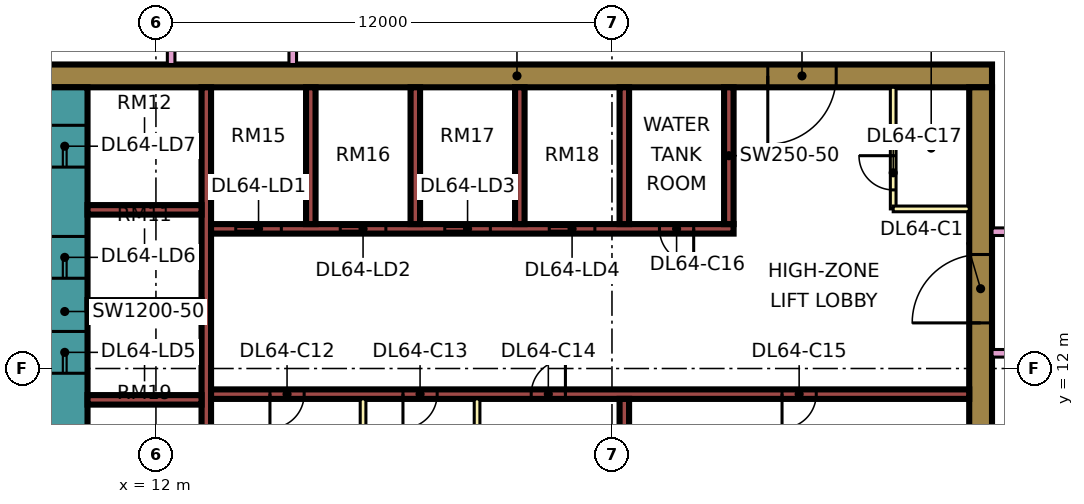
"""IFC4 building model, lengths in metres.
Left out: names, types, materials, properties, quantities, classifications, styles, units other than length and angle.
Written with IfcOpenShell. Run it as: python <this file> out.ifc"""

import sys

from ifc_helpers import new_model, si_unit, direction, frame, frame_2d, origin, place, context, subcontext, project, spatial, rectangle, extrude, element, fill, save


model = new_model("IFC4")
c1 = context("Model", 3, precision=1e-05, world=origin(), true_north=direction((0.0, 1.0)))
c2 = subcontext(c1, "Body", "Model", "MODEL_VIEW")
j1 = project(units=[si_unit("LENGTHUNIT", "METRE"), si_unit("PLANEANGLEUNIT", "RADIAN")], contexts=[c1])
p1 = place(None, origin())
s1 = spatial("IfcSite", under=j1, at=p1, CompositionType="ELEMENT")
p2 = place(p1, origin())
s2 = spatial("IfcBuilding", under=s1, at=p2, CompositionType="ELEMENT")
p3 = place(p2, frame((0.0, 0.0, 277.15)))
s3 = spatial("IfcBuildingStorey", under=s2, at=p3, CompositionType="ELEMENT", Elevation=277.15)
p4 = place(p3, frame((9.0, 19.7, 0.0), z_axis=(0.0, 0.0, 1.0), x_axis=(1.0, 0.0, 0.0)))
e1 = element("IfcWall", 1, at=p4, inside=s3, PredefinedType="SHEAR", context=c2, shape_type="SweptSolid", body=[
    extrude(rectangle(XDim=25.0, YDim=0.6, at=frame_2d((12.5, 0.0))), origin(), (0.0, 0.0, 1.0), 3.75),
])
p5 = place(p4, frame((19.1, 0.0, 0.0)))
e2 = element("IfcOpeningElement", 2, at=p5, cuts=e1, PredefinedType="OPENING", context=c2, shape_type="SweptSolid", body=[
    extrude(rectangle(XDim=1.8, YDim=2.4, at=frame_2d((0.9, 1.2))), frame((0.0, 0.31, 0.0), z_axis=(0.0, -1.0, 0.0), x_axis=(1.0, 0.0, 0.0)), (0.0, 0.0, 1.0), 0.62),
])
p6 = place(p3, frame((9.6, 7.6, 0.0), z_axis=(0.0, 0.0, 1.0), x_axis=(0.0, 1.0, 0.0)))
e3 = element("IfcWall", 3, at=p6, inside=s3, PredefinedType="SHEAR", context=c2, shape_type="SweptSolid", body=[
    extrude(rectangle(XDim=11.8, YDim=1.2, at=frame_2d((5.9, 0.0))), origin(), (0.0, 0.0, 1.0), 3.75),
])
p7 = place(p6, frame((4.275, 0.0, 0.0)))
e4 = element("IfcOpeningElement", 4, at=p7, cuts=e3, PredefinedType="OPENING", context=c2, shape_type="SweptSolid", body=[
    extrude(rectangle(XDim=1.1, YDim=2.2, at=frame_2d((0.55, 1.1))), frame((0.0, 0.61, 0.0), z_axis=(0.0, -1.0, 0.0), x_axis=(1.0, 0.0, 0.0)), (0.0, 0.0, 1.0), 1.22),
])
p8 = place(p6, frame((6.775, 0.0, 0.0)))
e5 = element("IfcOpeningElement", 5, at=p8, cuts=e3, PredefinedType="OPENING", context=c2, shape_type="SweptSolid", body=[
    extrude(rectangle(XDim=1.1, YDim=2.2, at=frame_2d((0.55, 1.1))), frame((0.0, 0.61, 0.0), z_axis=(0.0, -1.0, 0.0), x_axis=(1.0, 0.0, 0.0)), (0.0, 0.0, 1.0), 1.22),
])
p9 = place(p6, frame((9.7, 0.0, 0.0)))
e6 = element("IfcOpeningElement", 6, at=p9, cuts=e3, PredefinedType="OPENING", context=c2, shape_type="SweptSolid", body=[
    extrude(rectangle(XDim=1.1, YDim=2.2, at=frame_2d((0.55, 1.1))), frame((0.0, 0.61, 0.0), z_axis=(0.0, -1.0, 0.0), x_axis=(1.0, 0.0, 0.0)), (0.0, 0.0, 1.0), 1.22),
])
p10 = place(p6, frame((1.95, 0.0, 0.0)))
e7 = element("IfcOpeningElement", 7, at=p10, cuts=e3, PredefinedType="OPENING", context=c2, shape_type="SweptSolid", body=[
    extrude(rectangle(XDim=0.9, YDim=2.1, at=frame_2d((0.45, 1.05))), frame((0.0, 0.61, 0.0), z_axis=(0.0, -1.0, 0.0), x_axis=(1.0, 0.0, 0.0)), (0.0, 0.0, 1.0), 1.22),
])
p11 = place(p3, frame((33.7, 7.6, 0.0), z_axis=(0.0, 0.0, 1.0), x_axis=(0.0, 1.0, 0.0)))
e8 = element("IfcWall", 8, at=p11, inside=s3, PredefinedType="SHEAR", context=c2, shape_type="SweptSolid", body=[
    extrude(rectangle(XDim=11.8, YDim=0.6, at=frame_2d((5.9, 0.0))), origin(), (0.0, 0.0, 1.0), 3.75),
])
p12 = place(p11, frame((5.6, 0.0, 0.0)))
e9 = element("IfcOpeningElement", 9, at=p12, cuts=e8, PredefinedType="OPENING", context=c2, shape_type="SweptSolid", body=[
    extrude(rectangle(XDim=1.8, YDim=2.4, at=frame_2d((0.9, 1.2))), frame((0.0, 0.31, 0.0), z_axis=(0.0, -1.0, 0.0), x_axis=(1.0, 0.0, 0.0)), (0.0, 0.0, 1.0), 0.62),
])
p13 = place(p3, frame((13.325, 7.6, 0.0), z_axis=(0.0, 0.0, 1.0), x_axis=(0.0, 1.0, 0.0)))
e10 = element("IfcWall", 10, at=p13, inside=s3, PredefinedType="SHEAR", context=c2, shape_type="SweptSolid", body=[
    extrude(rectangle(XDim=11.8, YDim=0.25, at=frame_2d((5.9, 0.0))), origin(), (0.0, 0.0, 1.0), 3.75),
])
p14 = place(p3, frame((13.45, 11.325, 0.0), z_axis=(0.0, 0.0, 1.0), x_axis=(1.0, 0.0, 0.0)))
e11 = element("IfcWall", 11, at=p14, inside=s3, PredefinedType="SHEAR", context=c2, shape_type="SweptSolid", body=[
    extrude(rectangle(XDim=19.95, YDim=0.25, at=frame_2d((9.975, 0.0))), origin(), (0.0, 0.0, 1.0), 3.75),
])
p15 = place(p14, frame((1.55, 0.0, 0.0)))
e12 = element("IfcOpeningElement", 12, at=p15, cuts=e11, PredefinedType="OPENING", context=c2, shape_type="SweptSolid", body=[
    extrude(rectangle(XDim=0.9, YDim=2.1, at=frame_2d((0.45, 1.05))), frame((0.0, 0.135, 0.0), z_axis=(0.0, -1.0, 0.0), x_axis=(1.0, 0.0, 0.0)), (0.0, 0.0, 1.0), 0.27),
])
p16 = place(p14, frame((5.05, 0.0, 0.0)))
e13 = element("IfcOpeningElement", 13, at=p16, cuts=e11, PredefinedType="OPENING", context=c2, shape_type="SweptSolid", body=[
    extrude(rectangle(XDim=0.9, YDim=2.1, at=frame_2d((0.45, 1.05))), frame((0.0, 0.135, 0.0), z_axis=(0.0, -1.0, 0.0), x_axis=(1.0, 0.0, 0.0)), (0.0, 0.0, 1.0), 0.27),
])
p17 = place(p14, frame((8.425, 0.0, 0.0)))
e14 = element("IfcOpeningElement", 14, at=p17, cuts=e11, PredefinedType="OPENING", context=c2, shape_type="SweptSolid", body=[
    extrude(rectangle(XDim=0.9, YDim=2.1, at=frame_2d((0.45, 1.05))), frame((0.0, 0.135, 0.0), z_axis=(0.0, -1.0, 0.0), x_axis=(1.0, 0.0, 0.0)), (0.0, 0.0, 1.0), 0.27),
])
p18 = place(p14, frame((15.025, 0.0, 0.0)))
e15 = element("IfcOpeningElement", 15, at=p18, cuts=e11, PredefinedType="OPENING", context=c2, shape_type="SweptSolid", body=[
    extrude(rectangle(XDim=0.9, YDim=2.1, at=frame_2d((0.45, 1.05))), frame((0.0, 0.135, 0.0), z_axis=(0.0, -1.0, 0.0), x_axis=(1.0, 0.0, 0.0)), (0.0, 0.0, 1.0), 0.27),
])
p19 = place(p3, frame((13.45, 15.675, 0.0), z_axis=(0.0, 0.0, 1.0), x_axis=(1.0, 0.0, 0.0)))
e16 = element("IfcWall", 16, at=p19, inside=s3, PredefinedType="SHEAR", context=c2, shape_type="SweptSolid", body=[
    extrude(rectangle(XDim=13.75, YDim=0.25, at=frame_2d((6.875, 0.0))), origin(), (0.0, 0.0, 1.0), 3.75),
])
p20 = place(p19, frame((0.65, 0.0, 0.0)))
e17 = element("IfcOpeningElement", 17, at=p20, cuts=e16, PredefinedType="OPENING", context=c2, shape_type="SweptSolid", body=[
    extrude(rectangle(XDim=1.2, YDim=2.2, at=frame_2d((0.6, 1.1))), frame((0.0, 0.135, 0.0), z_axis=(0.0, -1.0, 0.0), x_axis=(1.0, 0.0, 0.0)), (0.0, 0.0, 1.0), 0.27),
])
p21 = place(p19, frame((3.4, 0.0, 0.0)))
e18 = element("IfcOpeningElement", 18, at=p21, cuts=e16, PredefinedType="OPENING", context=c2, shape_type="SweptSolid", body=[
    extrude(rectangle(XDim=1.2, YDim=2.2, at=frame_2d((0.6, 1.1))), frame((0.0, 0.135, 0.0), z_axis=(0.0, -1.0, 0.0), x_axis=(1.0, 0.0, 0.0)), (0.0, 0.0, 1.0), 0.27),
])
p22 = place(p19, frame((6.15, 0.0, 0.0)))
e19 = element("IfcOpeningElement", 19, at=p22, cuts=e16, PredefinedType="OPENING", context=c2, shape_type="SweptSolid", body=[
    extrude(rectangle(XDim=1.2, YDim=2.2, at=frame_2d((0.6, 1.1))), frame((0.0, 0.135, 0.0), z_axis=(0.0, -1.0, 0.0), x_axis=(1.0, 0.0, 0.0)), (0.0, 0.0, 1.0), 0.27),
])
p23 = place(p19, frame((8.9, 0.0, 0.0)))
e20 = element("IfcOpeningElement", 20, at=p23, cuts=e16, PredefinedType="OPENING", context=c2, shape_type="SweptSolid", body=[
    extrude(rectangle(XDim=1.2, YDim=2.2, at=frame_2d((0.6, 1.1))), frame((0.0, 0.135, 0.0), z_axis=(0.0, -1.0, 0.0), x_axis=(1.0, 0.0, 0.0)), (0.0, 0.0, 1.0), 0.27),
])
p24 = place(p19, frame((11.8, 0.0, 0.0)))
e21 = element("IfcOpeningElement", 21, at=p24, cuts=e16, PredefinedType="OPENING", context=c2, shape_type="SweptSolid", body=[
    extrude(rectangle(XDim=0.9, YDim=2.1, at=frame_2d((0.45, 1.05))), frame((0.0, 0.135, 0.0), z_axis=(0.0, -1.0, 0.0), x_axis=(1.0, 0.0, 0.0)), (0.0, 0.0, 1.0), 0.27),
])
for number, where, z_axis, x_axis in (
    (22, (10.2, 11.175, 0.0), (0.0, 0.0, 1.0), (1.0, 0.0, 0.0)),
    (23, (10.2, 13.675, 0.0), (0.0, 0.0, 1.0), (1.0, 0.0, 0.0)),
    (24, (10.2, 16.175, 0.0), (0.0, 0.0, 1.0), (1.0, 0.0, 0.0)),
):
    element("IfcWall", number, at=place(p3, frame(where, z_axis=z_axis, x_axis=x_axis)), inside=s3, PredefinedType="SHEAR", context=c2, shape_type="SweptSolid", body=[
        extrude(rectangle(XDim=3.0, YDim=0.25, at=frame_2d((1.5, 0.0))), origin(), (0.0, 0.0, 1.0), 3.75),
    ])
for number, where, z_axis, x_axis in (
    (25, (24.325, 7.6, 0.0), (0.0, 0.0, 1.0), (0.0, 1.0, 0.0)),
    (26, (16.075, 15.8, 0.0), (0.0, 0.0, 1.0), (0.0, 1.0, 0.0)),
    (27, (18.825, 15.8, 0.0), (0.0, 0.0, 1.0), (0.0, 1.0, 0.0)),
    (28, (21.575, 15.8, 0.0), (0.0, 0.0, 1.0), (0.0, 1.0, 0.0)),
    (29, (24.325, 15.8, 0.0), (0.0, 0.0, 1.0), (0.0, 1.0, 0.0)),
    (30, (27.075, 15.8, 0.0), (0.0, 0.0, 1.0), (0.0, 1.0, 0.0)),
):
    element("IfcWall", number, at=place(p3, frame(where, z_axis=z_axis, x_axis=x_axis)), inside=s3, PredefinedType="SHEAR", context=c2, shape_type="SweptSolid", body=[
        extrude(rectangle(XDim=3.6, YDim=0.25, at=frame_2d((1.8, 0.0))), origin(), (0.0, 0.0, 1.0), 3.75),
    ])
p25 = place(p3, frame((-1.447, 12.553, 0.0), z_axis=(0.0, 0.0, 1.0), x_axis=(0.707106781187, -0.707106781187, 0.0)))
e31 = element("IfcWall", 31, at=p25, inside=s3, PredefinedType="SOLIDWALL", context=c2, shape_type="SweptSolid", body=[
    extrude(rectangle(XDim=19.799, YDim=0.15, at=frame_2d((9.899, 0.0))), origin(), (0.0, 0.0, 1.0), 3.35),
])
p26 = place(p25, frame((2.212, 0.0, 0.45)))
e32 = element("IfcOpeningElement", 32, at=p26, cuts=e31, PredefinedType="OPENING", context=c2, shape_type="SweptSolid", body=[
    extrude(rectangle(XDim=3.0, YDim=2.4, at=frame_2d((1.5, 1.2))), frame((0.0, 0.085, 0.0), z_axis=(0.0, -1.0, 0.0), x_axis=(1.0, 0.0, 0.0)), (0.0, 0.0, 1.0), 0.17),
])
p27 = place(p25, frame((10.216, 0.0, 0.45)))
e33 = element("IfcOpeningElement", 33, at=p27, cuts=e31, PredefinedType="OPENING", context=c2, shape_type="SweptSolid", body=[
    extrude(rectangle(XDim=3.0, YDim=2.4, at=frame_2d((1.5, 1.2))), frame((0.0, 0.085, 0.0), z_axis=(0.0, -1.0, 0.0), x_axis=(1.0, 0.0, 0.0)), (0.0, 0.0, 1.0), 0.17),
])
for number, where, z_axis, x_axis in (
    (34, (17.45, 7.6, 0.0), (0.0, 0.0, 1.0), (0.0, 1.0, 0.0)),
    (35, (20.45, 7.6, 0.0), (0.0, 0.0, 1.0), (0.0, 1.0, 0.0)),
):
    element("IfcWall", number, at=place(p3, frame(where, z_axis=z_axis, x_axis=x_axis)), inside=s3, PredefinedType="PARTITIONING", context=c2, shape_type="SweptSolid", body=[
        extrude(rectangle(XDim=3.6, YDim=0.15, at=frame_2d((1.8, 0.0))), origin(), (0.0, 0.0, 1.0), 3.35),
    ])
p28 = place(p3, frame((31.4, 16.2, 0.0), z_axis=(0.0, 0.0, 1.0), x_axis=(0.0, 1.0, 0.0)))
e36 = element("IfcWall", 36, at=p28, inside=s3, PredefinedType="PARTITIONING", context=c2, shape_type="SweptSolid", body=[
    extrude(rectangle(XDim=3.2, YDim=0.15, at=frame_2d((1.6, 0.0))), origin(), (0.0, 0.0, 1.0), 3.35),
])
p29 = place(p28, frame((0.5, 0.0, 0.0)))
e37 = element("IfcOpeningElement", 37, at=p29, cuts=e36, PredefinedType="OPENING", context=c2, shape_type="SweptSolid", body=[
    extrude(rectangle(XDim=0.9, YDim=2.1, at=frame_2d((0.45, 1.05))), frame((0.0, 0.085, 0.0), z_axis=(0.0, -1.0, 0.0), x_axis=(1.0, 0.0, 0.0)), (0.0, 0.0, 1.0), 0.17),
])
p30 = place(p3, frame((31.4, 16.2, 0.0), z_axis=(0.0, 0.0, 1.0), x_axis=(1.0, 0.0, 0.0)))
e38 = element("IfcWall", 38, at=p30, inside=s3, PredefinedType="PARTITIONING", context=c2, shape_type="SweptSolid", body=[
    extrude(rectangle(XDim=2.0, YDim=0.15, at=frame_2d((1.0, 0.0))), origin(), (0.0, 0.0, 1.0), 3.35),
])
p31 = place(p3, frame((12.4, 20.0, 0.0), z_axis=(0.0, 0.0, 1.0), x_axis=(0.0, 1.0, 0.0)))
e39 = element("IfcWall", 39, at=p31, inside=s3, PredefinedType="PARTITIONING", context=c2, shape_type="SweptSolid", body=[
    extrude(rectangle(XDim=34.0, YDim=0.2, at=frame_2d((17.0, 0.0))), origin(), (0.0, 0.0, 1.0), 3.35),
])
p32 = place(p31, frame((16.95, 0.0, 0.0)))
e40 = element("IfcOpeningElement", 40, at=p32, cuts=e39, PredefinedType="OPENING", context=c2, shape_type="SweptSolid", body=[
    extrude(rectangle(XDim=1.0, YDim=2.1, at=frame_2d((0.5, 1.05))), frame((0.0, 0.11, 0.0), z_axis=(0.0, -1.0, 0.0), x_axis=(1.0, 0.0, 0.0)), (0.0, 0.0, 1.0), 0.22),
])
p33 = place(p31, frame((0.6, 0.0, 0.0)))
e41 = element("IfcOpeningElement", 41, at=p33, cuts=e39, PredefinedType="OPENING", context=c2, shape_type="SweptSolid", body=[
    extrude(rectangle(XDim=1.2, YDim=2.1, at=frame_2d((0.6, 1.05))), frame((0.0, 0.11, 0.0), z_axis=(0.0, -1.0, 0.0), x_axis=(1.0, 0.0, 0.0)), (0.0, 0.0, 1.0), 0.22),
])
p34 = place(p31, frame((13.65, 0.0, 0.0)))
e42 = element("IfcOpeningElement", 42, at=p34, cuts=e39, PredefinedType="OPENING", context=c2, shape_type="SweptSolid", body=[
    extrude(rectangle(XDim=1.0, YDim=2.1, at=frame_2d((0.5, 1.05))), frame((0.0, 0.11, 0.0), z_axis=(0.0, -1.0, 0.0), x_axis=(1.0, 0.0, 0.0)), (0.0, 0.0, 1.0), 0.22),
])
p35 = place(p3, frame((15.6, 20.0, 0.0), z_axis=(0.0, 0.0, 1.0), x_axis=(0.0, 1.0, 0.0)))
e43 = element("IfcWall", 43, at=p35, inside=s3, PredefinedType="PARTITIONING", context=c2, shape_type="SweptSolid", body=[
    extrude(rectangle(XDim=27.775, YDim=0.2, at=frame_2d((13.887, 0.0))), origin(), (0.0, 0.0, 1.0), 3.35),
])
p36 = place(p35, frame((5.95, 0.0, 0.0)))
e44 = element("IfcOpeningElement", 44, at=p36, cuts=e43, PredefinedType="OPENING", context=c2, shape_type="SweptSolid", body=[
    extrude(rectangle(XDim=1.0, YDim=2.1, at=frame_2d((0.5, 1.05))), frame((0.0, 0.11, 0.0), z_axis=(0.0, -1.0, 0.0), x_axis=(1.0, 0.0, 0.0)), (0.0, 0.0, 1.0), 0.22),
])
p37 = place(p35, frame((12.0, 0.0, 0.0)))
e45 = element("IfcOpeningElement", 45, at=p37, cuts=e43, PredefinedType="OPENING", context=c2, shape_type="SweptSolid", body=[
    extrude(rectangle(XDim=1.0, YDim=2.1, at=frame_2d((0.5, 1.05))), frame((0.0, 0.11, 0.0), z_axis=(0.0, -1.0, 0.0), x_axis=(1.0, 0.0, 0.0)), (0.0, 0.0, 1.0), 0.22),
])
p38 = place(p35, frame((16.9, 0.0, 0.0)))
e46 = element("IfcOpeningElement", 46, at=p38, cuts=e43, PredefinedType="OPENING", context=c2, shape_type="SweptSolid", body=[
    extrude(rectangle(XDim=1.0, YDim=2.1, at=frame_2d((0.5, 1.05))), frame((0.0, 0.11, 0.0), z_axis=(0.0, -1.0, 0.0), x_axis=(1.0, 0.0, 0.0)), (0.0, 0.0, 1.0), 0.22),
])
p39 = place(p35, frame((1.15, 0.0, 0.0)))
e47 = element("IfcOpeningElement", 47, at=p39, cuts=e43, PredefinedType="OPENING", context=c2, shape_type="SweptSolid", body=[
    extrude(rectangle(XDim=1.8, YDim=2.1, at=frame_2d((0.9, 1.05))), frame((0.0, 0.11, 0.0), z_axis=(0.0, -1.0, 0.0), x_axis=(1.0, 0.0, 0.0)), (0.0, 0.0, 1.0), 0.22),
])
p40 = place(p35, frame((25.9, 0.0, 0.0)))
e48 = element("IfcOpeningElement", 48, at=p40, cuts=e43, PredefinedType="OPENING", context=c2, shape_type="SweptSolid", body=[
    extrude(rectangle(XDim=1.0, YDim=2.1, at=frame_2d((0.5, 1.05))), frame((0.0, 0.11, 0.0), z_axis=(0.0, -1.0, 0.0), x_axis=(1.0, 0.0, 0.0)), (0.0, 0.0, 1.0), 0.22),
])
p41 = place(p3, frame((34.0, 12.4, 0.0), z_axis=(0.0, 0.0, 1.0), x_axis=(1.0, 0.0, 0.0)))
e49 = element("IfcWall", 49, at=p41, inside=s3, PredefinedType="PARTITIONING", context=c2, shape_type="SweptSolid", body=[
    extrude(rectangle(XDim=2.401, YDim=0.2, at=frame_2d((1.2, 0.0))), origin(), (0.0, 0.0, 1.0), 3.35),
])
p42 = place(p3, frame((34.0, 15.6, 0.0), z_axis=(0.0, 0.0, 1.0), x_axis=(1.0, 0.0, 0.0)))
e50 = element("IfcWall", 50, at=p42, inside=s3, PredefinedType="PARTITIONING", context=c2, shape_type="SweptSolid", body=[
    extrude(rectangle(XDim=10.35, YDim=0.2, at=frame_2d((5.175, 0.0))), origin(), (0.0, 0.0, 1.0), 3.35),
])
p43 = place(p42, frame((5.6, 0.0, 0.0)))
e51 = element("IfcOpeningElement", 51, at=p43, cuts=e50, PredefinedType="OPENING", context=c2, shape_type="SweptSolid", body=[
    extrude(rectangle(XDim=1.0, YDim=2.1, at=frame_2d((0.5, 1.05))), frame((0.0, 0.11, 0.0), z_axis=(0.0, -1.0, 0.0), x_axis=(1.0, 0.0, 0.0)), (0.0, 0.0, 1.0), 0.22),
])
p44 = place(p42, frame((0.45, 0.0, 0.0)))
e52 = element("IfcOpeningElement", 52, at=p44, cuts=e50, PredefinedType="OPENING", context=c2, shape_type="SweptSolid", body=[
    extrude(rectangle(XDim=1.2, YDim=2.1, at=frame_2d((0.6, 1.05))), frame((0.0, 0.11, 0.0), z_axis=(0.0, -1.0, 0.0), x_axis=(1.0, 0.0, 0.0)), (0.0, 0.0, 1.0), 0.22),
])
p45 = place(p20, origin())
e53 = element("IfcDoor", 53, at=p45, inside=s3, OperationType="DOUBLE_DOOR_SLIDING", PredefinedType="DOOR", context=c2, shape_type="SweptSolid", body=[
    extrude(rectangle(XDim=1.2, YDim=2.2, at=frame_2d((0.6, 1.1))), frame((0.0, 0.025, 0.0), z_axis=(0.0, -1.0, 0.0), x_axis=(1.0, 0.0, 0.0)), (0.0, 0.0, 1.0), 0.05),
])
fill(e17, e53)
p46 = place(p21, origin())
e54 = element("IfcDoor", 54, at=p46, inside=s3, OperationType="DOUBLE_DOOR_SLIDING", PredefinedType="DOOR", context=c2, shape_type="SweptSolid", body=[
    extrude(rectangle(XDim=1.2, YDim=2.2, at=frame_2d((0.6, 1.1))), frame((0.0, 0.025, 0.0), z_axis=(0.0, -1.0, 0.0), x_axis=(1.0, 0.0, 0.0)), (0.0, 0.0, 1.0), 0.05),
])
fill(e18, e54)
p47 = place(p22, origin())
e55 = element("IfcDoor", 55, at=p47, inside=s3, OperationType="DOUBLE_DOOR_SLIDING", PredefinedType="DOOR", context=c2, shape_type="SweptSolid", body=[
    extrude(rectangle(XDim=1.2, YDim=2.2, at=frame_2d((0.6, 1.1))), frame((0.0, 0.025, 0.0), z_axis=(0.0, -1.0, 0.0), x_axis=(1.0, 0.0, 0.0)), (0.0, 0.0, 1.0), 0.05),
])
fill(e19, e55)
p48 = place(p23, origin())
e56 = element("IfcDoor", 56, at=p48, inside=s3, OperationType="DOUBLE_DOOR_SLIDING", PredefinedType="DOOR", context=c2, shape_type="SweptSolid", body=[
    extrude(rectangle(XDim=1.2, YDim=2.2, at=frame_2d((0.6, 1.1))), frame((0.0, 0.025, 0.0), z_axis=(0.0, -1.0, 0.0), x_axis=(1.0, 0.0, 0.0)), (0.0, 0.0, 1.0), 0.05),
])
fill(e20, e56)
p49 = place(p7, origin())
e57 = element("IfcDoor", 57, at=p49, inside=s3, OperationType="DOUBLE_DOOR_SLIDING", PredefinedType="DOOR", context=c2, shape_type="SweptSolid", body=[
    extrude(rectangle(XDim=1.1, YDim=2.2, at=frame_2d((0.55, 1.1))), frame((0.0, 0.025, 0.0), z_axis=(0.0, -1.0, 0.0), x_axis=(1.0, 0.0, 0.0)), (0.0, 0.0, 1.0), 0.05),
])
fill(e4, e57)
p50 = place(p8, origin())
e58 = element("IfcDoor", 58, at=p50, inside=s3, OperationType="DOUBLE_DOOR_SLIDING", PredefinedType="DOOR", context=c2, shape_type="SweptSolid", body=[
    extrude(rectangle(XDim=1.1, YDim=2.2, at=frame_2d((0.55, 1.1))), frame((0.0, 0.025, 0.0), z_axis=(0.0, -1.0, 0.0), x_axis=(1.0, 0.0, 0.0)), (0.0, 0.0, 1.0), 0.05),
])
fill(e5, e58)
p51 = place(p9, origin())
e59 = element("IfcDoor", 59, at=p51, inside=s3, OperationType="DOUBLE_DOOR_SLIDING", PredefinedType="DOOR", context=c2, shape_type="SweptSolid", body=[
    extrude(rectangle(XDim=1.1, YDim=2.2, at=frame_2d((0.55, 1.1))), frame((0.0, 0.025, 0.0), z_axis=(0.0, -1.0, 0.0), x_axis=(1.0, 0.0, 0.0)), (0.0, 0.0, 1.0), 0.05),
])
fill(e6, e59)
p52 = place(p12, origin())
e60 = element("IfcDoor", 60, at=p52, inside=s3, OperationType="DOUBLE_DOOR_SINGLE_SWING", PredefinedType="DOOR", context=c2, shape_type="SweptSolid", body=[
    extrude(rectangle(XDim=1.8, YDim=2.4, at=frame_2d((0.9, 1.2))), frame((0.0, 0.025, 0.0), z_axis=(0.0, -1.0, 0.0), x_axis=(1.0, 0.0, 0.0)), (0.0, 0.0, 1.0), 0.05),
])
fill(e9, e60)
p53 = place(p5, frame((1.8, 0.0, 0.0), z_axis=(0.0, 0.0, 1.0), x_axis=(-1.0, 0.0, 0.0)))
e61 = element("IfcDoor", 61, at=p53, inside=s3, OperationType="DOUBLE_DOOR_SINGLE_SWING", PredefinedType="DOOR", context=c2, shape_type="SweptSolid", body=[
    extrude(rectangle(XDim=1.8, YDim=2.4, at=frame_2d((0.9, 1.2))), frame((0.0, 0.025, 0.0), z_axis=(0.0, -1.0, 0.0), x_axis=(1.0, 0.0, 0.0)), (0.0, 0.0, 1.0), 0.05),
])
fill(e2, e61)
p54 = place(p15, frame((0.9, 0.0, 0.0), z_axis=(0.0, 0.0, 1.0), x_axis=(-1.0, 0.0, 0.0)))
e62 = element("IfcDoor", 62, at=p54, inside=s3, OperationType="SINGLE_SWING_LEFT", PredefinedType="DOOR", context=c2, shape_type="SweptSolid", body=[
    extrude(rectangle(XDim=0.9, YDim=2.1, at=frame_2d((0.45, 1.05))), frame((0.0, 0.025, 0.0), z_axis=(0.0, -1.0, 0.0), x_axis=(1.0, 0.0, 0.0)), (0.0, 0.0, 1.0), 0.05),
])
fill(e12, e62)
p55 = place(p16, frame((0.9, 0.0, 0.0), z_axis=(0.0, 0.0, 1.0), x_axis=(-1.0, 0.0, 0.0)))
e63 = element("IfcDoor", 63, at=p55, inside=s3, OperationType="SINGLE_SWING_LEFT", PredefinedType="DOOR", context=c2, shape_type="SweptSolid", body=[
    extrude(rectangle(XDim=0.9, YDim=2.1, at=frame_2d((0.45, 1.05))), frame((0.0, 0.025, 0.0), z_axis=(0.0, -1.0, 0.0), x_axis=(1.0, 0.0, 0.0)), (0.0, 0.0, 1.0), 0.05),
])
fill(e13, e63)
p56 = place(p17, frame((0.9, 0.0, 0.0), z_axis=(0.0, 0.0, 1.0), x_axis=(-1.0, 0.0, 0.0)))
e64 = element("IfcDoor", 64, at=p56, inside=s3, OperationType="SINGLE_SWING_RIGHT", PredefinedType="DOOR", context=c2, shape_type="SweptSolid", body=[
    extrude(rectangle(XDim=0.9, YDim=2.1, at=frame_2d((0.45, 1.05))), frame((0.0, 0.025, 0.0), z_axis=(0.0, -1.0, 0.0), x_axis=(1.0, 0.0, 0.0)), (0.0, 0.0, 1.0), 0.05),
])
fill(e14, e64)
p57 = place(p18, frame((0.9, 0.0, 0.0), z_axis=(0.0, 0.0, 1.0), x_axis=(-1.0, 0.0, 0.0)))
e65 = element("IfcDoor", 65, at=p57, inside=s3, OperationType="SINGLE_SWING_LEFT", PredefinedType="DOOR", context=c2, shape_type="SweptSolid", body=[
    extrude(rectangle(XDim=0.9, YDim=2.1, at=frame_2d((0.45, 1.05))), frame((0.0, 0.025, 0.0), z_axis=(0.0, -1.0, 0.0), x_axis=(1.0, 0.0, 0.0)), (0.0, 0.0, 1.0), 0.05),
])
fill(e15, e65)
p58 = place(p24, origin())
e66 = element("IfcDoor", 66, at=p58, inside=s3, OperationType="SINGLE_SWING_RIGHT", PredefinedType="DOOR", context=c2, shape_type="SweptSolid", body=[
    extrude(rectangle(XDim=0.9, YDim=2.1, at=frame_2d((0.45, 1.05))), frame((0.0, 0.025, 0.0), z_axis=(0.0, -1.0, 0.0), x_axis=(1.0, 0.0, 0.0)), (0.0, 0.0, 1.0), 0.05),
])
fill(e21, e66)
p59 = place(p29, frame((0.9, 0.0, 0.0), z_axis=(0.0, 0.0, 1.0), x_axis=(-1.0, 0.0, 0.0)))
e67 = element("IfcDoor", 67, at=p59, inside=s3, OperationType="SINGLE_SWING_RIGHT", PredefinedType="DOOR", context=c2, shape_type="SweptSolid", body=[
    extrude(rectangle(XDim=0.9, YDim=2.1, at=frame_2d((0.45, 1.05))), frame((0.0, 0.025, 0.0), z_axis=(0.0, -1.0, 0.0), x_axis=(1.0, 0.0, 0.0)), (0.0, 0.0, 1.0), 0.05),
])
fill(e37, e67)
save(model, sys.argv[1])
